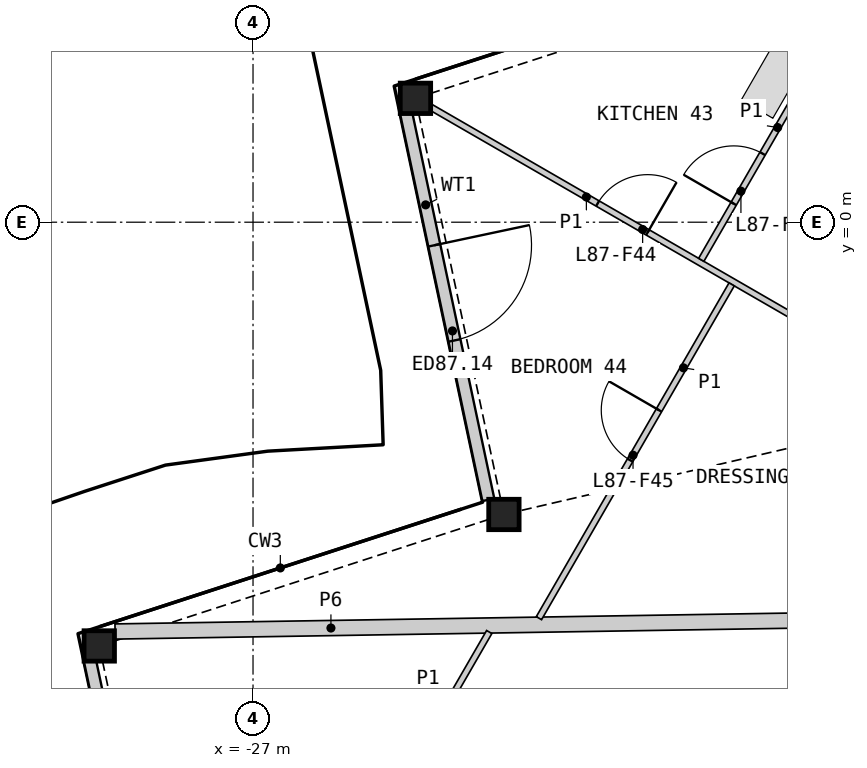
"""IFC4 building model, lengths in metres.
Left out: names, types, materials, properties, quantities, classifications, styles, units other than length and angle.
Written with IfcOpenShell. Run it as: python <this file> out.ifc"""

import sys

from ifc_helpers import new_model, si_unit, direction, frame, frame_2d, origin, origin_2d, place, context, subcontext, project, spatial, rectangle, hollow_rectangle, extrude, element, fill, save


model = new_model("IFC4")
c1 = context("Model", 3, precision=1e-05, world=origin(), true_north=direction((0.0, 1.0)))
c2 = subcontext(c1, "Body", "Model", "MODEL_VIEW")
j1 = project(units=[si_unit("LENGTHUNIT", "METRE"), si_unit("PLANEANGLEUNIT", "RADIAN")], contexts=[c1])
p1 = place(None, origin())
s1 = spatial("IfcSite", under=j1, at=p1, CompositionType="ELEMENT")
p2 = place(p1, origin())
s2 = spatial("IfcBuilding", under=s1, at=p2, CompositionType="ELEMENT")
p3 = place(p2, frame((0.0, 0.0, 384.8)))
s3 = spatial("IfcBuildingStorey", under=s2, at=p3, CompositionType="ELEMENT", Elevation=384.8)
for number, where, z_axis, x_axis in (
    (1, (-24.329, 2.037, 0.0), (0.0, 0.0, 1.0), (1.0, 0.0, 0.0)),
    (2, (-22.874, -4.807, 0.0), (0.0, 0.0, 1.0), (1.0, 0.0, 0.0)),
    (3, (-29.529, -6.969, 0.0), (0.0, 0.0, 1.0), (1.0, 0.0, 0.0)),
):
    element("IfcColumn", number, at=place(p3, frame(where, z_axis=z_axis, x_axis=x_axis)), inside=s3, PredefinedType="COLUMN", context=c2, shape_type="SweptSolid", body=[
        extrude(hollow_rectangle(XDim=0.5, YDim=0.5, WallThickness=0.03, at=origin_2d()), origin(), (0.0, 0.0, 1.0), 3.4),
    ])
p4 = place(p3, frame((-24.505, 1.902, 0.0), z_axis=(0.0, 0.0, 1.0), x_axis=(0.207917488951, -0.978146368285, 0.0)))
e4 = element("IfcWall", 4, at=p4, inside=s3, PredefinedType="SOLIDWALL", context=c2, shape_type="SweptSolid", body=[
    extrude(rectangle(XDim=6.612, YDim=0.2, at=frame_2d((3.306, 0.0))), origin(), (0.0, 0.0, 1.0), 2.634),
])
p5 = place(p4, frame((2.333, 0.0, 0.0)))
e5 = element("IfcOpeningElement", 5, at=p5, cuts=e4, PredefinedType="OPENING", context=c2, shape_type="SweptSolid", body=[
    extrude(rectangle(XDim=1.6, YDim=2.25, at=frame_2d((0.8, 1.125))), frame((0.0, 0.11, 0.0), z_axis=(0.0, -1.0, 0.0), x_axis=(1.0, 0.0, 0.0)), (0.0, 0.0, 1.0), 0.22),
])
p6 = place(p3, frame((-29.705, -7.105, 0.0), z_axis=(0.0, 0.0, 1.0), x_axis=(0.207924998532, -0.978144771997, 0.0)))
e6 = element("IfcWall", 6, at=p6, inside=s3, PredefinedType="SOLIDWALL", context=c2, shape_type="SweptSolid", body=[
    extrude(rectangle(XDim=6.612, YDim=0.2, at=frame_2d((3.306, 0.0))), origin(), (0.0, 0.0, 1.0), 2.634),
])
p7 = place(p6, frame((2.333, 0.0, 0.0)))
e7 = element("IfcOpeningElement", 7, at=p7, cuts=e6, PredefinedType="OPENING", context=c2, shape_type="SweptSolid", body=[
    extrude(rectangle(XDim=1.6, YDim=2.25, at=frame_2d((0.8, 1.125))), frame((0.0, 0.11, 0.0), z_axis=(0.0, -1.0, 0.0), x_axis=(1.0, 0.0, 0.0)), (0.0, 0.0, 1.0), 0.22),
])
p8 = place(p3, frame((-29.269, -6.732, 0.0), z_axis=(0.0, 0.0, 1.0), x_axis=(0.999870533117, 0.016090898164, 0.0)))
e8 = element("IfcWall", 8, at=p8, inside=s3, PredefinedType="PARTITIONING", context=c2, shape_type="SweptSolid", body=[
    extrude(rectangle(XDim=14.202, YDim=0.25, at=frame_2d((7.101, 0.0))), origin(), (0.0, 0.0, 1.0), 2.33),
])
p9 = place(p3, frame((-24.069, 1.887, 0.0), z_axis=(0.0, 0.0, 1.0), x_axis=(0.866023404247, -0.500003463284, 0.0)))
e9 = element("IfcWall", 9, at=p9, inside=s3, PredefinedType="PARTITIONING", context=c2, shape_type="SweptSolid", body=[
    extrude(rectangle(XDim=11.782, YDim=0.1, at=frame_2d((5.891, 0.0))), origin(), (0.0, 0.0, 1.0), 2.33),
])
p10 = place(p9, frame((3.159, 0.0, 0.0)))
e10 = element("IfcOpeningElement", 10, at=p10, cuts=e9, PredefinedType="OPENING", context=c2, shape_type="SweptSolid", body=[
    extrude(rectangle(XDim=0.95, YDim=2.1, at=frame_2d((0.475, 1.05))), frame((0.0, 0.06, 0.0), z_axis=(0.0, -1.0, 0.0), x_axis=(1.0, 0.0, 0.0)), (0.0, 0.0, 1.0), 0.12),
])
p11 = place(p3, frame((-22.298, -6.512, 0.0), z_axis=(0.0, 0.0, 1.0), x_axis=(0.499991387631, 0.866030376081, 0.0)))
e11 = element("IfcWall", 11, at=p11, inside=s3, PredefinedType="PARTITIONING", context=c2, shape_type="SweptSolid", body=[
    extrude(rectangle(XDim=6.339, YDim=0.1, at=frame_2d((3.169, 0.0))), origin(), (0.0, 0.0, 1.0), 2.33),
])
p12 = place(p11, frame((3.0, 0.0, 0.0)))
e12 = element("IfcOpeningElement", 12, at=p12, cuts=e11, PredefinedType="OPENING", context=c2, shape_type="SweptSolid", body=[
    extrude(rectangle(XDim=0.95, YDim=2.1, at=frame_2d((0.475, 1.05))), frame((0.0, 0.06, 0.0), z_axis=(0.0, -1.0, 0.0), x_axis=(1.0, 0.0, 0.0)), (0.0, 0.0, 1.0), 0.12),
])
p13 = place(p3, frame((-19.628, -0.619, 0.0), z_axis=(0.0, 0.0, 1.0), x_axis=(0.499990214365, 0.86603105345, 0.0)))
e13 = element("IfcWall", 13, at=p13, inside=s3, PredefinedType="PARTITIONING", context=c2, shape_type="SweptSolid", body=[
    extrude(rectangle(XDim=5.025, YDim=0.1, at=frame_2d((2.512, 0.0))), origin(), (0.0, 0.0, 1.0), 2.33),
])
p14 = place(p13, frame((1.067, 0.0, 0.0)))
e14 = element("IfcOpeningElement", 14, at=p14, cuts=e13, PredefinedType="OPENING", context=c2, shape_type="SweptSolid", body=[
    extrude(rectangle(XDim=0.95, YDim=2.1, at=frame_2d((0.475, 1.05))), frame((0.0, 0.06, 0.0), z_axis=(0.0, -1.0, 0.0), x_axis=(1.0, 0.0, 0.0)), (0.0, 0.0, 1.0), 0.12),
])
p15 = place(p3, frame((-24.414, -8.989, 0.0), z_axis=(0.0, 0.0, 1.0), x_axis=(0.500042595688, 0.866000809756, 0.0)))
e15 = element("IfcWall", 15, at=p15, inside=s3, PredefinedType="PARTITIONING", context=c2, shape_type="SweptSolid", body=[
    extrude(rectangle(XDim=2.596, YDim=0.1, at=frame_2d((1.298, 0.0))), origin(), (0.0, 0.0, 1.0), 2.33),
])
p16 = place(p5, origin())
e16 = element("IfcDoor", 16, at=p16, inside=s3, OperationType="DOUBLE_DOOR_SINGLE_SWING", PredefinedType="DOOR", context=c2, shape_type="SweptSolid", body=[
    extrude(rectangle(XDim=1.6, YDim=2.25, at=frame_2d((0.8, 1.125))), frame((0.0, 0.025, 0.0), z_axis=(0.0, -1.0, 0.0), x_axis=(1.0, 0.0, 0.0)), (0.0, 0.0, 1.0), 0.05),
])
fill(e5, e16)
p17 = place(p14, origin())
e17 = element("IfcDoor", 17, at=p17, inside=s3, OperationType="SINGLE_SWING_LEFT", PredefinedType="DOOR", context=c2, shape_type="SweptSolid", body=[
    extrude(rectangle(XDim=0.95, YDim=2.1, at=frame_2d((0.475, 1.05))), frame((0.0, 0.025, 0.0), z_axis=(0.0, -1.0, 0.0), x_axis=(1.0, 0.0, 0.0)), (0.0, 0.0, 1.0), 0.05),
])
fill(e14, e17)
p18 = place(p10, origin())
e18 = element("IfcDoor", 18, at=p18, inside=s3, OperationType="SINGLE_SWING_RIGHT", PredefinedType="DOOR", context=c2, shape_type="SweptSolid", body=[
    extrude(rectangle(XDim=0.95, YDim=2.1, at=frame_2d((0.475, 1.05))), frame((0.0, 0.025, 0.0), z_axis=(0.0, -1.0, 0.0), x_axis=(1.0, 0.0, 0.0)), (0.0, 0.0, 1.0), 0.05),
])
fill(e10, e18)
p19 = place(p12, origin())
e19 = element("IfcDoor", 19, at=p19, inside=s3, OperationType="SINGLE_SWING_RIGHT", PredefinedType="DOOR", context=c2, shape_type="SweptSolid", body=[
    extrude(rectangle(XDim=0.95, YDim=2.1, at=frame_2d((0.475, 1.05))), frame((0.0, 0.025, 0.0), z_axis=(0.0, -1.0, 0.0), x_axis=(1.0, 0.0, 0.0)), (0.0, 0.0, 1.0), 0.05),
])
fill(e12, e19)
save(model, sys.argv[1])
